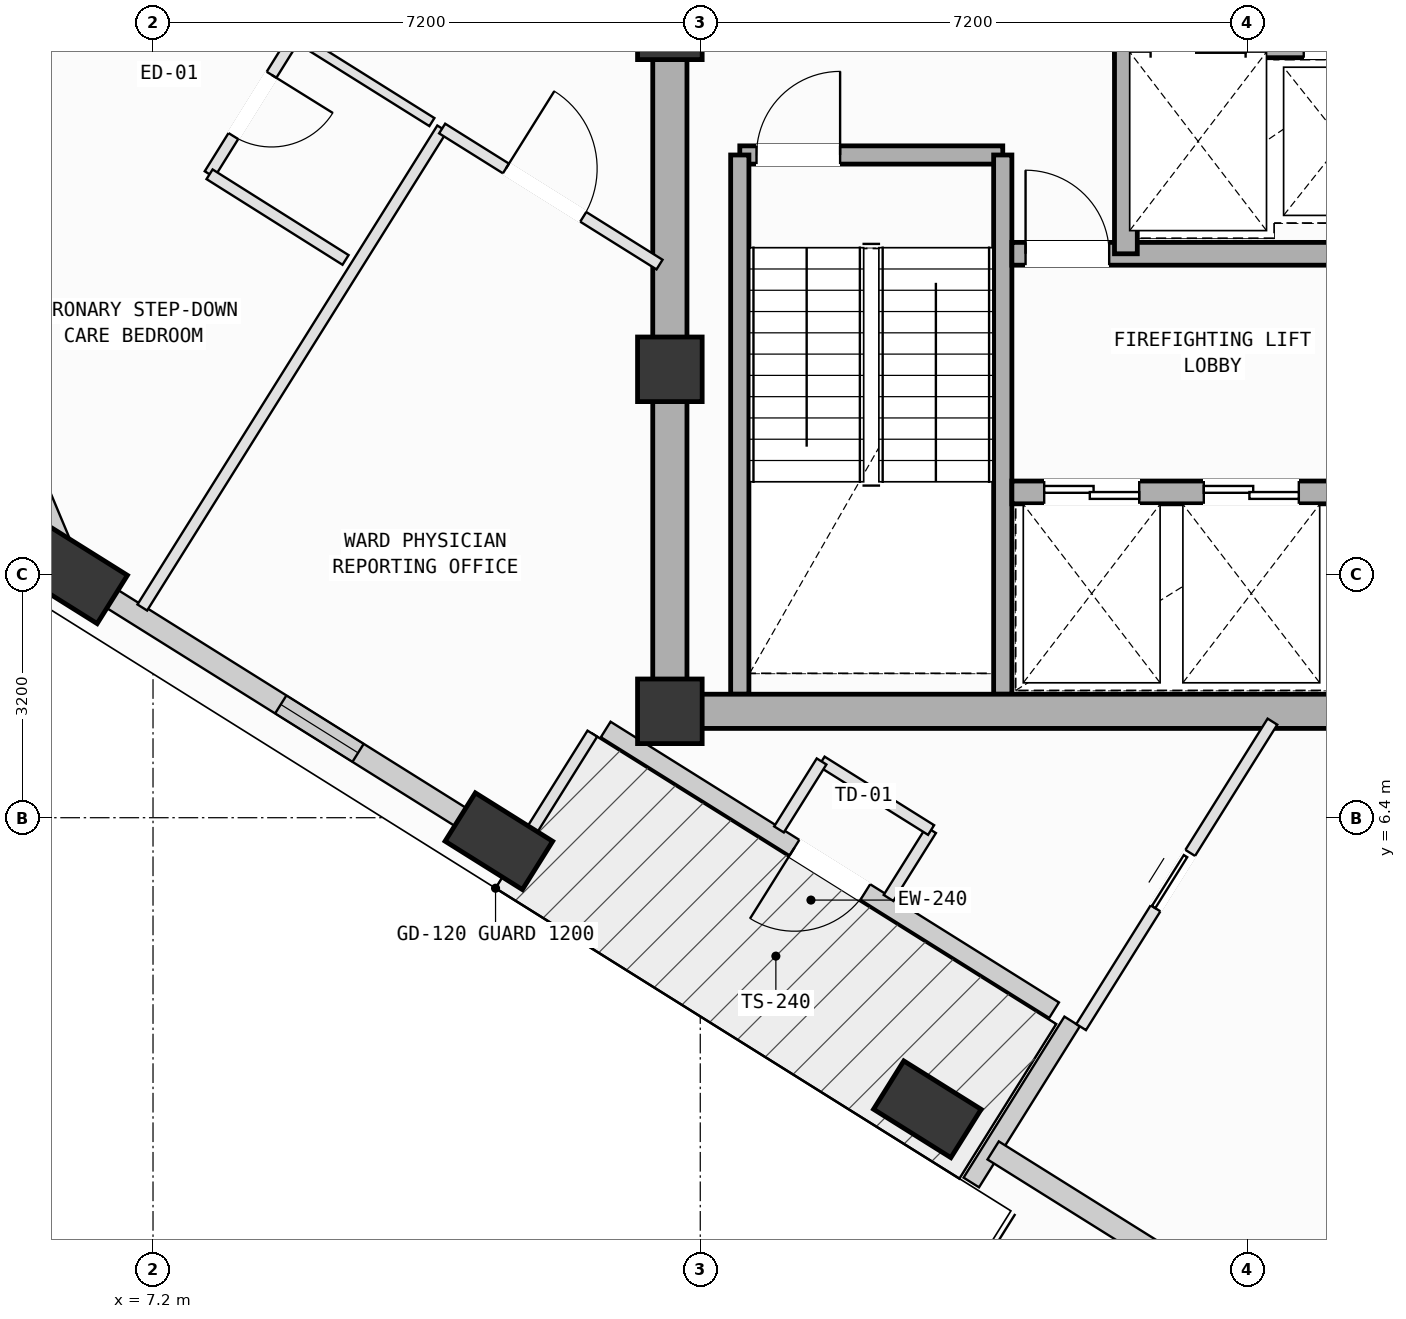
"""IFC4 building model, lengths in metres.
Left out: names, types, materials, properties, quantities, classifications, styles, units other than length and angle.
Written with IfcOpenShell. Run it as: python <this file> out.ifc"""

import sys

from ifc_helpers import new_model, si_unit, direction, frame, frame_2d, origin, origin_2d, place, context, subcontext, project, spatial, rectangle, extrude, element, fill, save


model = new_model("IFC4")
c1 = context("Model", 3, precision=1e-05, world=origin(), true_north=direction((0.0, 1.0)))
c2 = subcontext(c1, "Body", "Model", "MODEL_VIEW")
j1 = project(units=[si_unit("LENGTHUNIT", "METRE"), si_unit("PLANEANGLEUNIT", "RADIAN")], contexts=[c1])
p1 = place(None, origin())
s1 = spatial("IfcSite", under=j1, at=p1, CompositionType="ELEMENT")
p2 = place(p1, origin())
s2 = spatial("IfcBuilding", under=s1, at=p2, CompositionType="ELEMENT")
p3 = place(p2, frame((0.0, 0.0, 272.6)))
s3 = spatial("IfcBuildingStorey", under=s2, at=p3, CompositionType="ELEMENT", Elevation=272.6)
for number, where, z_axis, x_axis in (
    (1, (14.0, 7.8, 0.0), (0.0, 0.0, 1.0), (1.0, 0.0, 0.0)),
    (2, (14.0, 12.3, 0.0), (0.0, 0.0, 1.0), (1.0, 0.0, 0.0)),
    (3, (14.0, 16.8, 0.0), (0.0, 0.0, 1.0), (1.0, 0.0, 0.0)),
):
    element("IfcColumn", number, at=place(p3, frame(where, z_axis=z_axis, x_axis=x_axis)), inside=s3, PredefinedType="COLUMN", context=c2, shape_type="SweptSolid", body=[
        extrude(rectangle(XDim=0.85, YDim=0.85, at=origin_2d()), origin(), (0.0, 0.0, 1.0), 4.0),
    ])
p4 = place(p3, frame((6.156, 9.59, 0.084), z_axis=(0.06340833724, -0.112341015051, 0.991644532635), x_axis=(-0.996784461674, 0.041648675863, 0.068455275645)))
e4 = element("IfcColumn", 4, at=p4, inside=s3, PredefinedType="COLUMN", context=c2, shape_type="SweptSolid", body=[
    extrude(rectangle(XDim=1.2, YDim=0.75, at=origin_2d()), origin(), (0.0, 0.0, 1.0), 3.947),
])
p5 = place(p3, frame((11.75, 6.09, 0.078), z_axis=(0.077728278065, -0.08929167345, 0.992967930923), x_axis=(-0.985266808969, -0.159068511941, 0.062821363036)))
e5 = element("IfcColumn", 5, at=p5, inside=s3, PredefinedType="COLUMN", context=c2, shape_type="SweptSolid", body=[
    extrude(rectangle(XDim=1.2, YDim=0.75, at=origin_2d()), origin(), (0.0, 0.0, 1.0), 3.948),
])
p6 = place(p3, frame((17.387, 2.564, 0.074), z_axis=(0.092115832099, -0.066088472828, 0.993552709843), x_axis=(-0.922479746167, -0.381328888244, 0.060161423698)))
e6 = element("IfcColumn", 6, at=p6, inside=s3, PredefinedType="COLUMN", context=c2, shape_type="SweptSolid", body=[
    extrude(rectangle(XDim=1.2, YDim=0.75, at=origin_2d()), origin(), (0.0, 0.0, 1.0), 3.949),
])
p7 = place(p3, frame((19.055, 3.868, 0.0), z_axis=(0.0, 0.0, 1.0), x_axis=(-0.847586178769, 0.530657770658, 0.0)))
e7 = element("IfcWall", 7, at=p7, inside=s3, PredefinedType="SOLIDWALL", context=c2, shape_type="SweptSolid", body=[
    extrude(rectangle(XDim=6.96, YDim=0.24, at=frame_2d((3.48, 0.0))), origin(), (0.0, 0.0, 1.0), 2.765),
])
p8 = place(p7, frame((2.93, 0.0, 0.0)))
e8 = element("IfcOpeningElement", 8, at=p8, cuts=e7, PredefinedType="OPENING", context=c2, shape_type="SweptSolid", body=[
    extrude(rectangle(XDim=1.1, YDim=2.15, at=frame_2d((0.55, 1.075))), frame((0.0, 0.13, 0.0), z_axis=(0.0, -1.0, 0.0), x_axis=(1.0, 0.0, 0.0)), (0.0, 0.0, 1.0), 0.26),
])
p9 = place(p3, frame((17.966, 1.6, 0.0), z_axis=(0.0, 0.0, 1.0), x_axis=(0.530674698105, 0.847575580577, 0.0)))
e9 = element("IfcWall", 9, at=p9, inside=s3, PredefinedType="SOLIDWALL", context=c2, shape_type="SweptSolid", body=[
    extrude(rectangle(XDim=2.5, YDim=0.24, at=frame_2d((1.25, 0.0))), origin(), (0.0, 0.0, 1.0), 3.265),
])
p10 = place(p3, frame((4.236, 14.552, 0.0), z_axis=(0.0, 0.0, 1.0), x_axis=(0.530664333184, 0.847582070059, 0.0)))
e10 = element("IfcWall", 10, at=p10, inside=s3, PredefinedType="SOLIDWALL", context=c2, shape_type="SweptSolid", body=[
    extrude(rectangle(XDim=7.485, YDim=0.28, at=frame_2d((3.742, 0.0))), origin(), (0.0, 0.0, 1.0), 3.265),
])
p11 = place(p3, frame((6.097, 9.727, 0.0), z_axis=(0.0, 0.0, 1.0), x_axis=(-0.386419734829, 0.922323039143, 0.0)))
e11 = element("IfcWall", 11, at=p11, inside=s3, PredefinedType="SOLIDWALL", context=c2, shape_type="SweptSolid", body=[
    extrude(rectangle(XDim=4.408, YDim=0.28, at=frame_2d((2.204, 0.0))), origin(), (0.0, 0.0, 1.0), 3.265),
])
p12 = place(p3, frame((11.606, 6.184, 0.0), z_axis=(0.0, 0.0, 1.0), x_axis=(-0.847576941241, 0.530672524893, 0.0)))
e12 = element("IfcWall", 12, at=p12, inside=s3, PredefinedType="SOLIDWALL", context=c2, shape_type="SweptSolid", body=[
    extrude(rectangle(XDim=5.83, YDim=0.28, at=frame_2d((2.915, 0.0))), origin(), (0.0, 0.0, 1.0), 2.765),
])
p13 = place(p12, frame((2.015, 0.0, 0.75)))
e13 = element("IfcOpeningElement", 13, at=p13, cuts=e12, PredefinedType="OPENING", context=c2, shape_type="SweptSolid", body=[
    extrude(rectangle(XDim=1.2, YDim=1.75, at=frame_2d((0.6, 0.875))), frame((0.0, 0.15, 0.0), z_axis=(0.0, -1.0, 0.0), x_axis=(1.0, 0.0, 0.0)), (0.0, 0.0, 1.0), 0.3),
])
p14 = place(p3, frame((24.317, -1.774, 0.0), z_axis=(0.0, 0.0, 1.0), x_axis=(-0.847587721297, 0.530655306867, 0.0)))
e14 = element("IfcWall", 14, at=p14, inside=s3, PredefinedType="SOLIDWALL", context=c2, shape_type="SweptSolid", body=[
    extrude(rectangle(XDim=7.153, YDim=0.28, at=frame_2d((3.577, 0.0))), origin(), (0.0, 0.0, 1.0), 3.265),
])
p15 = place(p14, frame((2.813, 0.0, 0.75)))
e15 = element("IfcOpeningElement", 15, at=p15, cuts=e14, PredefinedType="OPENING", context=c2, shape_type="SweptSolid", body=[
    extrude(rectangle(XDim=1.2, YDim=1.75, at=frame_2d((0.6, 0.875))), frame((0.0, 0.15, 0.0), z_axis=(0.0, -1.0, 0.0), x_axis=(1.0, 0.0, 0.0)), (0.0, 0.0, 1.0), 0.3),
])
p16 = place(p14, frame((0.742, 0.0, 0.75)))
e16 = element("IfcOpeningElement", 16, at=p16, cuts=e14, PredefinedType="OPENING", context=c2, shape_type="SweptSolid", body=[
    extrude(rectangle(XDim=1.2, YDim=1.75, at=frame_2d((0.6, 0.875))), frame((0.0, 0.15, 0.0), z_axis=(0.0, -1.0, 0.0), x_axis=(1.0, 0.0, 0.0)), (0.0, 0.0, 1.0), 0.3),
])
p17 = place(p3, frame((14.92, 15.12, 0.0), z_axis=(0.0, 0.0, 1.0), x_axis=(1.0, 0.0, 0.0)))
e17 = element("IfcWall", 17, at=p17, inside=s3, PredefinedType="SOLIDWALL", context=c2, shape_type="SweptSolid", body=[
    extrude(rectangle(XDim=3.46, YDim=0.24, at=frame_2d((1.73, 0.0))), origin(), (0.0, 0.0, 1.0), 3.78),
])
p18 = place(p17, frame((0.22, 0.0, 0.0)))
e18 = element("IfcOpeningElement", 18, at=p18, cuts=e17, PredefinedType="OPENING", context=c2, shape_type="SweptSolid", body=[
    extrude(rectangle(XDim=1.1, YDim=2.15, at=frame_2d((0.55, 1.075))), frame((0.0, 0.13, 0.0), z_axis=(0.0, -1.0, 0.0), x_axis=(1.0, 0.0, 0.0)), (0.0, 0.0, 1.0), 0.26),
])
for number, where, z_axis, x_axis in (
    (19, (18.38, 15.12, 0.0), (0.0, 0.0, 1.0), (0.0, -1.0, 0.0)),
    (20, (14.92, 8.025, 0.0), (0.0, 0.0, 1.0), (0.0, 1.0, 0.0)),
):
    element("IfcWall", number, at=place(p3, frame(where, z_axis=z_axis, x_axis=x_axis)), inside=s3, PredefinedType="SOLIDWALL", context=c2, shape_type="SweptSolid", body=[
        extrude(rectangle(XDim=7.095, YDim=0.24, at=frame_2d((3.548, 0.0))), origin(), (0.0, 0.0, 1.0), 3.78),
    ])
p19 = place(p3, frame((14.0, 7.8, 0.0), z_axis=(0.0, 0.0, 1.0), x_axis=(1.0, 0.0, 0.0)))
e21 = element("IfcWall", 21, at=p19, inside=s3, PredefinedType="SHEAR", context=c2, shape_type="SweptSolid", body=[
    extrude(rectangle(XDim=10.8, YDim=0.45, at=frame_2d((5.4, 0.0))), origin(), (0.0, 0.0, 1.0), 3.78),
])
p20 = place(p3, frame((14.0, 16.8, 0.0), z_axis=(0.0, 0.0, 1.0), x_axis=(0.0, -1.0, 0.0)))
e22 = element("IfcWall", 22, at=p20, inside=s3, PredefinedType="SHEAR", context=c2, shape_type="SweptSolid", body=[
    extrude(rectangle(XDim=9.0, YDim=0.45, at=frame_2d((4.5, 0.0))), origin(), (0.0, 0.0, 1.0), 3.78),
])
p21 = place(p3, frame((19.85, 16.55, 0.0), z_axis=(0.0, 0.0, 1.0), x_axis=(1.0, 0.0, 0.0)))
e23 = element("IfcWall", 23, at=p21, inside=s3, PredefinedType="SOLIDWALL", context=c2, shape_type="SweptSolid", body=[
    extrude(rectangle(XDim=4.525, YDim=0.3, at=frame_2d((2.262, 0.0))), origin(), (0.0, 0.0, 1.0), 3.78),
])
p22 = place(p21, frame((0.475, 0.0, 0.0)))
e24 = element("IfcOpeningElement", 24, at=p22, cuts=e23, PredefinedType="OPENING", context=c2, shape_type="SweptSolid", body=[
    extrude(rectangle(XDim=1.25, YDim=2.18, at=frame_2d((0.625, 1.09))), frame((0.0, 0.16, 0.0), z_axis=(0.0, -1.0, 0.0), x_axis=(1.0, 0.0, 0.0)), (0.0, 0.0, 1.0), 0.32),
])
p23 = place(p21, frame((2.49, 0.0, 0.0)))
e25 = element("IfcOpeningElement", 25, at=p23, cuts=e23, PredefinedType="OPENING", context=c2, shape_type="SweptSolid", body=[
    extrude(rectangle(XDim=1.02, YDim=2.12, at=frame_2d((0.51, 1.06))), frame((0.0, 0.16, 0.0), z_axis=(0.0, -1.0, 0.0), x_axis=(1.0, 0.0, 0.0)), (0.0, 0.0, 1.0), 0.32),
])
p24 = place(p3, frame((18.5, 10.68, 0.0), z_axis=(0.0, 0.0, 1.0), x_axis=(1.0, 0.0, 0.0)))
e26 = element("IfcWall", 26, at=p24, inside=s3, PredefinedType="SOLIDWALL", context=c2, shape_type="SweptSolid", body=[
    extrude(rectangle(XDim=5.3, YDim=0.3, at=frame_2d((2.65, 0.0))), origin(), (0.0, 0.0, 1.0), 3.78),
])
p25 = place(p24, frame((4.22, 0.0, 0.0)))
e27 = element("IfcOpeningElement", 27, at=p25, cuts=e26, PredefinedType="OPENING", context=c2, shape_type="SweptSolid", body=[
    extrude(rectangle(XDim=0.86, YDim=2.06, at=frame_2d((0.43, 1.03))), frame((0.0, 0.16, 0.0), z_axis=(0.0, -1.0, 0.0), x_axis=(1.0, 0.0, 0.0)), (0.0, 0.0, 1.0), 0.32),
])
p26 = place(p24, frame((0.425, 0.0, 0.0)))
e28 = element("IfcOpeningElement", 28, at=p26, cuts=e26, PredefinedType="OPENING", context=c2, shape_type="SweptSolid", body=[
    extrude(rectangle(XDim=1.25, YDim=2.18, at=frame_2d((0.625, 1.09))), frame((0.0, 0.16, 0.0), z_axis=(0.0, -1.0, 0.0), x_axis=(1.0, 0.0, 0.0)), (0.0, 0.0, 1.0), 0.32),
])
p27 = place(p24, frame((2.525, 0.0, 0.0)))
e29 = element("IfcOpeningElement", 29, at=p27, cuts=e26, PredefinedType="OPENING", context=c2, shape_type="SweptSolid", body=[
    extrude(rectangle(XDim=1.25, YDim=2.18, at=frame_2d((0.625, 1.09))), frame((0.0, 0.16, 0.0), z_axis=(0.0, -1.0, 0.0), x_axis=(1.0, 0.0, 0.0)), (0.0, 0.0, 1.0), 0.32),
])
p28 = place(p3, frame((18.5, 13.82, 0.0), z_axis=(0.0, 0.0, 1.0), x_axis=(1.0, 0.0, 0.0)))
e30 = element("IfcWall", 30, at=p28, inside=s3, PredefinedType="SOLIDWALL", context=c2, shape_type="SweptSolid", body=[
    extrude(rectangle(XDim=5.3, YDim=0.3, at=frame_2d((2.65, 0.0))), origin(), (0.0, 0.0, 1.0), 3.78),
])
p29 = place(p28, frame((0.18, 0.0, 0.0)))
e31 = element("IfcOpeningElement", 31, at=p29, cuts=e30, PredefinedType="OPENING", context=c2, shape_type="SweptSolid", body=[
    extrude(rectangle(XDim=1.1, YDim=2.15, at=frame_2d((0.55, 1.075))), frame((0.0, 0.16, 0.0), z_axis=(0.0, -1.0, 0.0), x_axis=(1.0, 0.0, 0.0)), (0.0, 0.0, 1.0), 0.32),
])
p30 = place(p3, frame((20.0, 13.82, 0.0), z_axis=(0.0, 0.0, 1.0), x_axis=(0.0, 1.0, 0.0)))
e32 = element("IfcWall", 32, at=p30, inside=s3, PredefinedType="SOLIDWALL", context=c2, shape_type="SweptSolid", body=[
    extrude(rectangle(XDim=2.73, YDim=0.3, at=frame_2d((1.365, 0.0))), origin(), (0.0, 0.0, 1.0), 3.78),
])
p31 = place(p3, frame((19.411, 3.645, 0.0), z_axis=(0.0, 0.0, 1.0), x_axis=(0.530785412047, 0.847506251515, 0.0)))
e33 = element("IfcWall", 33, at=p31, inside=s3, PredefinedType="PARTITIONING", context=c2, shape_type="SweptSolid", body=[
    extrude(rectangle(XDim=4.742, YDim=0.15, at=frame_2d((2.371, 0.0))), origin(), (0.0, 0.0, 1.0), 3.78),
])
p32 = place(p31, frame((1.844, 0.0, 0.0)))
e34 = element("IfcOpeningElement", 34, at=p32, cuts=e33, PredefinedType="OPENING", context=c2, shape_type="SweptSolid", body=[
    extrude(rectangle(XDim=0.86, YDim=2.06, at=frame_2d((0.43, 1.03))), frame((0.0, 0.085, 0.0), z_axis=(0.0, -1.0, 0.0), x_axis=(1.0, 0.0, 0.0)), (0.0, 0.0, 1.0), 0.17),
])
p33 = place(p3, frame((16.877, 5.344, 0.0), z_axis=(0.0, 0.0, 1.0), x_axis=(0.530872325741, 0.847451812059, 0.0)))
e35 = element("IfcWall", 35, at=p33, inside=s3, PredefinedType="PARTITIONING", context=c2, shape_type="SweptSolid", body=[
    extrude(rectangle(XDim=1.055, YDim=0.15, at=frame_2d((0.527, 0.0))), origin(), (0.0, 0.0, 1.0), 3.78),
])
p34 = place(p3, frame((17.437, 6.238, 0.0), z_axis=(0.0, 0.0, 1.0), x_axis=(-0.847659246406, 0.530541046463, 0.0)))
e36 = element("IfcWall", 36, at=p34, inside=s3, PredefinedType="PARTITIONING", context=c2, shape_type="SweptSolid", body=[
    extrude(rectangle(XDim=1.7, YDim=0.15, at=frame_2d((0.85, 0.0))), origin(), (0.0, 0.0, 1.0), 3.78),
])
p35 = place(p3, frame((15.996, 7.14, 0.0), z_axis=(0.0, 0.0, 1.0), x_axis=(-0.53097645439, -0.847386573462, 0.0)))
e37 = element("IfcWall", 37, at=p35, inside=s3, PredefinedType="PARTITIONING", context=c2, shape_type="SweptSolid", body=[
    extrude(rectangle(XDim=1.055, YDim=0.15, at=frame_2d((0.527, 0.0))), origin(), (0.0, 0.0, 1.0), 3.78),
])
p36 = place(p3, frame((12.98, 7.506, 0.0), z_axis=(0.0, 0.0, 1.0), x_axis=(-0.530695000378, -0.847562868803, 0.0)))
e38 = element("IfcWall", 38, at=p36, inside=s3, PredefinedType="PARTITIONING", context=c2, shape_type="SweptSolid", body=[
    extrude(rectangle(XDim=2.08, YDim=0.15, at=frame_2d((1.04, 0.0))), origin(), (0.0, 0.0, 1.0), 2.745),
])
p37 = place(p3, frame((11.876, 5.743, 0.0), z_axis=(0.0, 0.0, 1.0), x_axis=(-0.846989396805, 0.5316097833, 0.0)))
e39 = element("IfcWall", 39, at=p37, inside=s3, PredefinedType="PARTITIONING", context=c2, shape_type="SweptSolid", body=[
    extrude(rectangle(XDim=0.463, YDim=0.15, at=frame_2d((0.231, 0.0))), origin(), (0.0, 0.0, 1.0), 3.245),
])
p38 = place(p3, frame((7.059, 9.166, 0.0), z_axis=(0.0, 0.0, 1.0), x_axis=(0.530586195895, 0.847630986176, 0.0)))
e40 = element("IfcWall", 40, at=p38, inside=s3, PredefinedType="PARTITIONING", context=c2, shape_type="SweptSolid", body=[
    extrude(rectangle(XDim=7.435, YDim=0.15, at=frame_2d((3.717, 0.0))), origin(), (0.0, 0.0, 1.0), 3.415),
])
p39 = place(p3, frame((11.004, 15.468, 0.0), z_axis=(0.0, 0.0, 1.0), x_axis=(0.847668872786, -0.530525665836, 0.0)))
e41 = element("IfcWall", 41, at=p39, inside=s3, PredefinedType="PARTITIONING", context=c2, shape_type="SweptSolid", body=[
    extrude(rectangle(XDim=3.374, YDim=0.15, at=frame_2d((1.687, 0.0))), origin(), (0.0, 0.0, 1.0), 3.78),
])
p40 = place(p39, frame((0.99, 0.0, 0.0)))
e42 = element("IfcOpeningElement", 42, at=p40, cuts=e41, PredefinedType="OPENING", context=c2, shape_type="SweptSolid", body=[
    extrude(rectangle(XDim=1.2, YDim=2.15, at=frame_2d((0.6, 1.075))), frame((0.0, 0.085, 0.0), z_axis=(0.0, -1.0, 0.0), x_axis=(1.0, 0.0, 0.0)), (0.0, 0.0, 1.0), 0.17),
])
p41 = place(p3, frame((9.072, 16.678, 0.0), z_axis=(0.0, 0.0, 1.0), x_axis=(-0.528455802258, -0.848960814796, 0.0)))
e43 = element("IfcWall", 43, at=p41, inside=s3, PredefinedType="PARTITIONING", context=c2, shape_type="SweptSolid", body=[
    extrude(rectangle(XDim=2.134, YDim=0.15, at=frame_2d((1.067, 0.0))), origin(), (0.0, 0.0, 1.0), 3.78),
])
p42 = place(p41, frame((0.592, 0.0, 0.0)))
e44 = element("IfcOpeningElement", 44, at=p42, cuts=e43, PredefinedType="OPENING", context=c2, shape_type="SweptSolid", body=[
    extrude(rectangle(XDim=0.95, YDim=2.1, at=frame_2d((0.475, 1.05))), frame((0.0, 0.085, 0.0), z_axis=(0.0, -1.0, 0.0), x_axis=(1.0, 0.0, 0.0)), (0.0, 0.0, 1.0), 0.17),
])
p43 = place(p3, frame((7.944, 14.866, 0.0), z_axis=(0.0, 0.0, 1.0), x_axis=(0.846092038833, -0.533036829706, 0.0)))
e45 = element("IfcWall", 45, at=p43, inside=s3, PredefinedType="PARTITIONING", context=c2, shape_type="SweptSolid", body=[
    extrude(rectangle(XDim=2.114, YDim=0.15, at=frame_2d((1.057, 0.0))), origin(), (0.0, 0.0, 1.0), 3.78),
])
p44 = place(p3, frame((6.542, 9.083, 0.0), z_axis=(0.0, 0.0, 1.0), x_axis=(-0.847610563835, 0.53061881994, 0.0)))
e46 = element("IfcWall", 46, at=p44, inside=s3, PredefinedType="PARTITIONING", context=c2, shape_type="SweptSolid", body=[
    extrude(rectangle(XDim=2.407, YDim=0.15, at=frame_2d((1.203, 0.0))), origin(), (0.0, 0.0, 1.0), 2.765),
])
p45 = place(p3, frame((9.089, 16.668, 0.0), z_axis=(0.0, 0.0, 1.0), x_axis=(0.847436188004, -0.530897266202, 0.0)))
e47 = element("IfcWall", 47, at=p45, inside=s3, PredefinedType="PARTITIONING", context=c2, shape_type="SweptSolid", body=[
    extrude(rectangle(XDim=2.1, YDim=0.125, at=frame_2d((1.05, 0.0))), origin(), (0.0, 0.0, 1.0), 3.78),
])
p46 = place(p8, origin())
e48 = element("IfcDoor", 48, at=p46, inside=s3, OperationType="SINGLE_SWING_RIGHT", PredefinedType="DOOR", context=c2, shape_type="SweptSolid", body=[
    extrude(rectangle(XDim=1.1, YDim=2.15, at=frame_2d((0.55, 1.075))), frame((0.0, 0.025, 0.0), z_axis=(0.0, -1.0, 0.0), x_axis=(1.0, 0.0, 0.0)), (0.0, 0.0, 1.0), 0.05),
])
fill(e8, e48)
p47 = place(p13, origin())
e49 = element("IfcWindow", 49, at=p47, inside=s3, PartitioningType="SINGLE_PANEL", PredefinedType="WINDOW", context=c2, shape_type="SweptSolid", body=[
    extrude(rectangle(XDim=1.2, YDim=1.75, at=frame_2d((0.6, 0.875))), frame((0.0, 0.03, 0.0), z_axis=(0.0, -1.0, 0.0), x_axis=(1.0, 0.0, 0.0)), (0.0, 0.0, 1.0), 0.06),
])
fill(e13, e49)
p48 = place(p18, origin())
e50 = element("IfcDoor", 50, at=p48, inside=s3, OperationType="SINGLE_SWING_RIGHT", PredefinedType="DOOR", context=c2, shape_type="SweptSolid", body=[
    extrude(rectangle(XDim=1.1, YDim=2.15, at=frame_2d((0.55, 1.075))), frame((0.0, 0.025, 0.0), z_axis=(0.0, -1.0, 0.0), x_axis=(1.0, 0.0, 0.0)), (0.0, 0.0, 1.0), 0.05),
])
fill(e18, e50)
p49 = place(p29, origin())
e51 = element("IfcDoor", 51, at=p49, inside=s3, OperationType="SINGLE_SWING_LEFT", PredefinedType="DOOR", context=c2, shape_type="SweptSolid", body=[
    extrude(rectangle(XDim=1.1, YDim=2.15, at=frame_2d((0.55, 1.075))), frame((0.0, 0.025, 0.0), z_axis=(0.0, -1.0, 0.0), x_axis=(1.0, 0.0, 0.0)), (0.0, 0.0, 1.0), 0.05),
])
fill(e31, e51)
p50 = place(p26, origin())
e52 = element("IfcDoor", 52, at=p50, inside=s3, OperationType="DOUBLE_DOOR_SLIDING", PredefinedType="DOOR", context=c2, shape_type="SweptSolid", body=[
    extrude(rectangle(XDim=1.25, YDim=2.18, at=frame_2d((0.625, 1.09))), frame((0.0, 0.025, 0.0), z_axis=(0.0, -1.0, 0.0), x_axis=(1.0, 0.0, 0.0)), (0.0, 0.0, 1.0), 0.05),
])
fill(e28, e52)
p51 = place(p27, origin())
e53 = element("IfcDoor", 53, at=p51, inside=s3, OperationType="DOUBLE_DOOR_SLIDING", PredefinedType="DOOR", context=c2, shape_type="SweptSolid", body=[
    extrude(rectangle(XDim=1.25, YDim=2.18, at=frame_2d((0.625, 1.09))), frame((0.0, 0.025, 0.0), z_axis=(0.0, -1.0, 0.0), x_axis=(1.0, 0.0, 0.0)), (0.0, 0.0, 1.0), 0.05),
])
fill(e29, e53)
p52 = place(p40, origin())
e54 = element("IfcDoor", 54, at=p52, inside=s3, OperationType="SINGLE_SWING_LEFT", PredefinedType="DOOR", context=c2, shape_type="SweptSolid", body=[
    extrude(rectangle(XDim=1.2, YDim=2.15, at=frame_2d((0.6, 1.075))), frame((0.0, 0.025, 0.0), z_axis=(0.0, -1.0, 0.0), x_axis=(1.0, 0.0, 0.0)), (0.0, 0.0, 1.0), 0.05),
])
fill(e42, e54)
p53 = place(p42, origin())
e55 = element("IfcDoor", 55, at=p53, inside=s3, OperationType="SINGLE_SWING_LEFT", PredefinedType="DOOR", context=c2, shape_type="SweptSolid", body=[
    extrude(rectangle(XDim=0.95, YDim=2.1, at=frame_2d((0.475, 1.05))), frame((0.0, 0.025, 0.0), z_axis=(0.0, -1.0, 0.0), x_axis=(1.0, 0.0, 0.0)), (0.0, 0.0, 1.0), 0.05),
])
fill(e44, e55)
p54 = place(p32, origin())
e56 = element("IfcDoor", 56, at=p54, inside=s3, OperationType="SLIDING_TO_LEFT", PredefinedType="DOOR", context=c2, shape_type="SweptSolid", body=[
    extrude(rectangle(XDim=0.86, YDim=2.06, at=frame_2d((0.43, 1.03))), frame((0.0, 0.025, 0.0), z_axis=(0.0, -1.0, 0.0), x_axis=(1.0, 0.0, 0.0)), (0.0, 0.0, 1.0), 0.05),
])
fill(e34, e56)
save(model, sys.argv[1])
